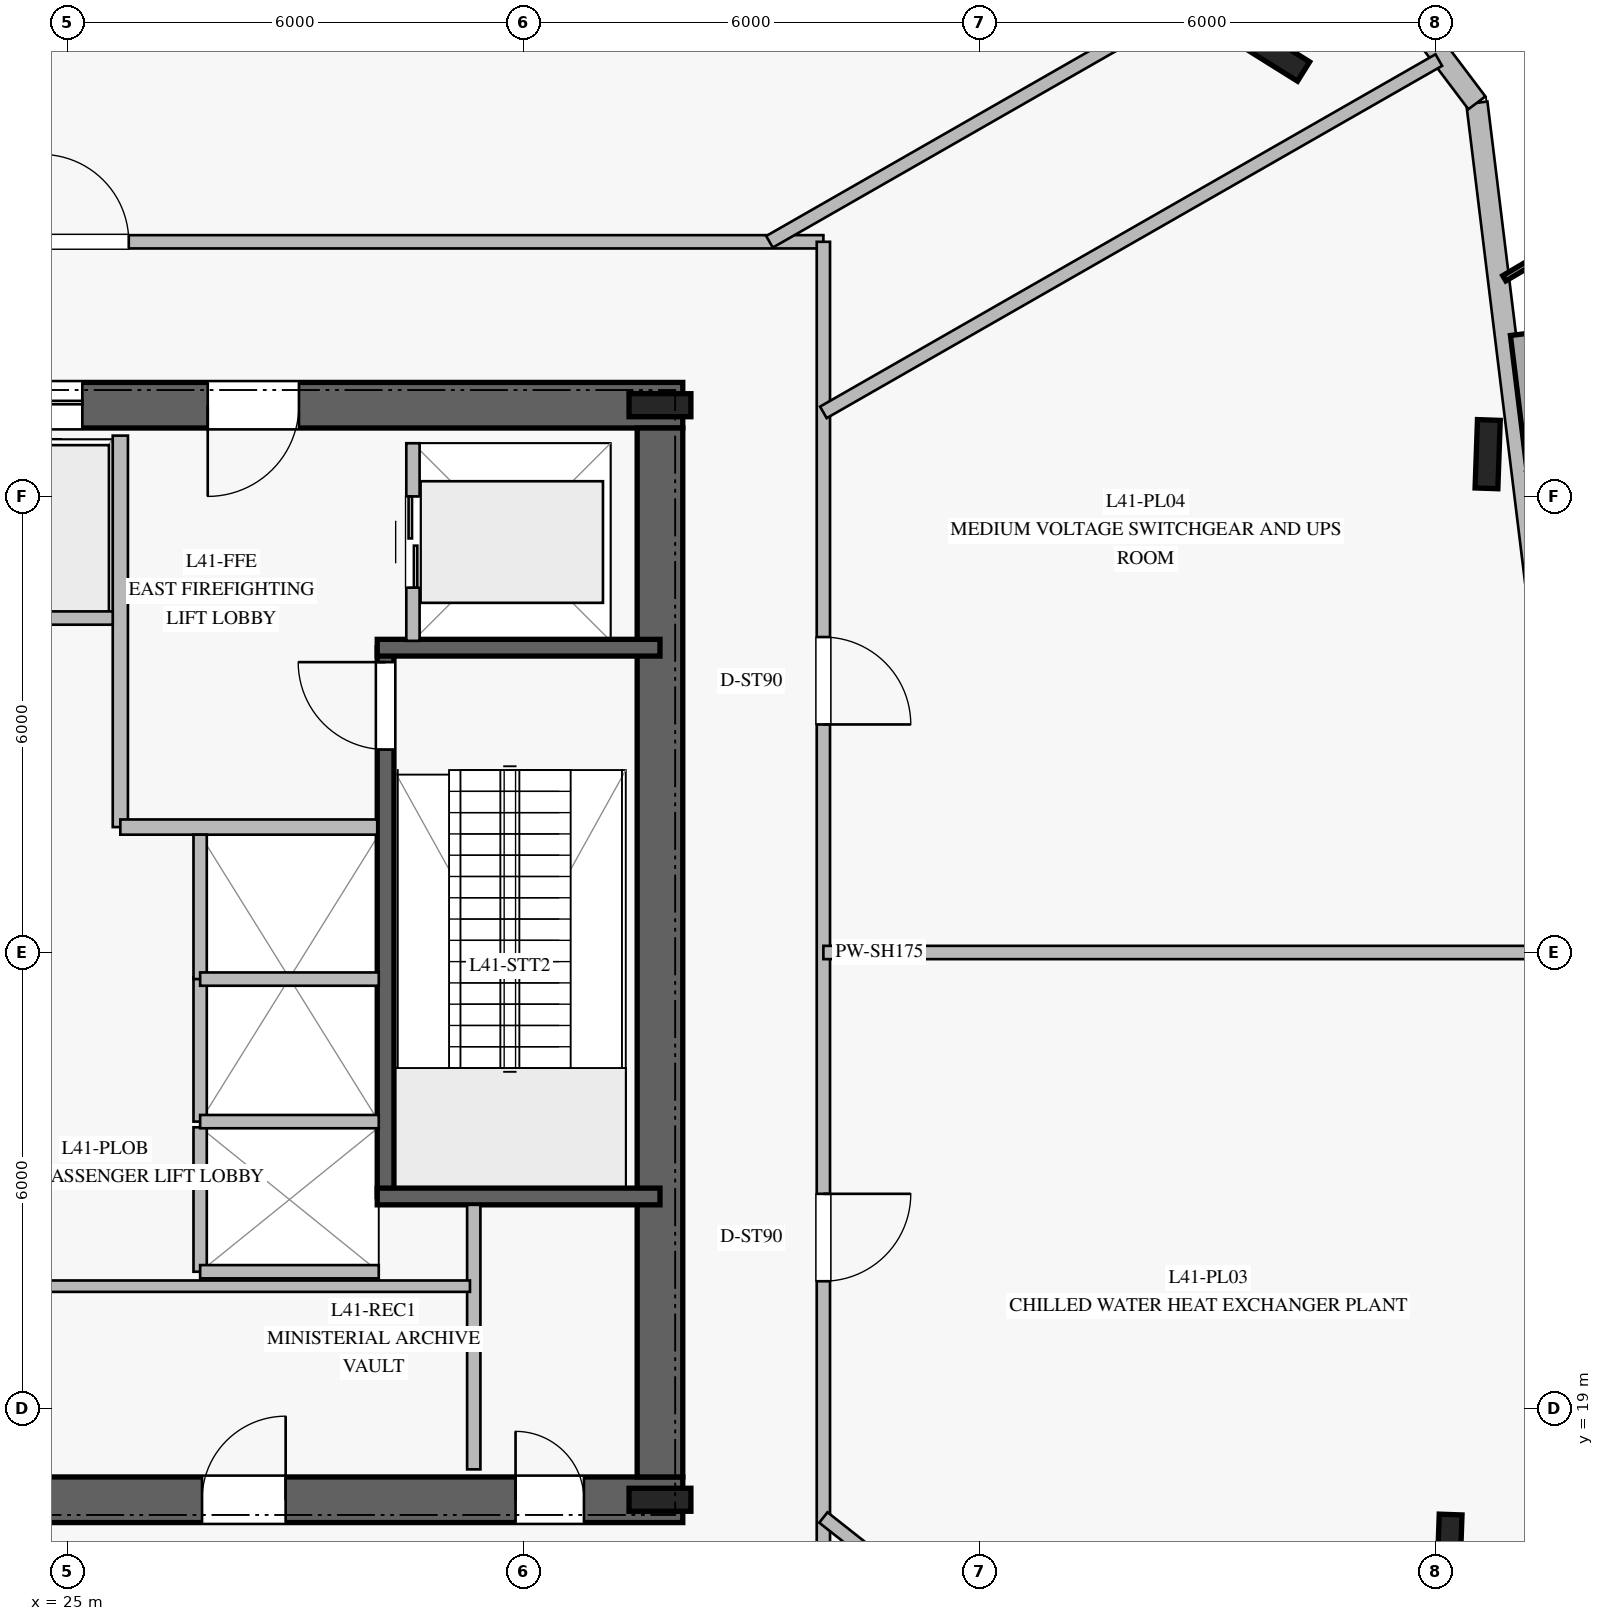
"""IFC4 building model, lengths in metres.
Left out: names, types, materials, properties, quantities, classifications, styles, units other than length and angle.
Written with IfcOpenShell. Run it as: python <this file> out.ifc"""

import sys

from ifc_helpers import new_model, si_unit, direction, frame, frame_2d, origin, origin_2d, place, context, subcontext, project, spatial, rectangle, i_section, extrude, element, fill, save


model = new_model("IFC4")
c1 = context("Model", 3, precision=1e-05, world=origin(), true_north=direction((0.0, 1.0)))
c2 = subcontext(c1, "Body", "Model", "MODEL_VIEW")
j1 = project(units=[si_unit("LENGTHUNIT", "METRE"), si_unit("PLANEANGLEUNIT", "RADIAN")], contexts=[c1])
p1 = place(None, origin())
s1 = spatial("IfcSite", under=j1, at=p1, CompositionType="ELEMENT")
p2 = place(p1, origin())
s2 = spatial("IfcBuilding", under=s1, at=p2, CompositionType="ELEMENT")
p3 = place(p2, frame((0.0, 0.0, 170.4)))
s3 = spatial("IfcBuildingStorey", under=s2, at=p3, CompositionType="ELEMENT", Elevation=170.4)
p4 = place(p3, frame((16.9, 17.8, 0.0), z_axis=(0.0, 0.0, 1.0), x_axis=(1.0, 0.0, 0.0)))
e1 = element("IfcWall", 1, at=p4, inside=s3, PredefinedType="SHEAR", context=c2, shape_type="SweptSolid", body=[
    extrude(rectangle(XDim=16.2, YDim=0.6, at=frame_2d((8.1, 0.0))), origin(), (0.0, 0.0, 1.0), 5.14),
])
p5 = place(p4, frame((5.05, 0.0, 0.0)))
e2 = element("IfcOpeningElement", 2, at=p5, cuts=e1, PredefinedType="OPENING", context=c2, shape_type="SweptSolid", body=[
    extrude(rectangle(XDim=1.2, YDim=2.25, at=frame_2d((0.6, 1.125))), frame((0.0, 0.31, 0.0), z_axis=(0.0, -1.0, 0.0), x_axis=(1.0, 0.0, 0.0)), (0.0, 0.0, 1.0), 0.62),
])
p6 = place(p4, frame((14.0, 0.0, 0.0)))
e3 = element("IfcOpeningElement", 3, at=p6, cuts=e1, PredefinedType="OPENING", context=c2, shape_type="SweptSolid", body=[
    extrude(rectangle(XDim=0.9, YDim=2.1, at=frame_2d((0.45, 1.05))), frame((0.0, 0.31, 0.0), z_axis=(0.0, -1.0, 0.0), x_axis=(1.0, 0.0, 0.0)), (0.0, 0.0, 1.0), 0.62),
])
p7 = place(p4, frame((9.875, 0.0, 0.0)))
e4 = element("IfcOpeningElement", 4, at=p7, cuts=e1, PredefinedType="OPENING", context=c2, shape_type="SweptSolid", body=[
    extrude(rectangle(XDim=1.1, YDim=2.2, at=frame_2d((0.55, 1.1))), frame((0.0, 0.31, 0.0), z_axis=(0.0, -1.0, 0.0), x_axis=(1.0, 0.0, 0.0)), (0.0, 0.0, 1.0), 0.62),
])
p8 = place(p3, frame((33.1, 32.2, 0.0), z_axis=(0.0, 0.0, 1.0), x_axis=(-1.0, 0.0, 0.0)))
e5 = element("IfcWall", 5, at=p8, inside=s3, PredefinedType="SHEAR", context=c2, shape_type="SweptSolid", body=[
    extrude(rectangle(XDim=16.2, YDim=0.6, at=frame_2d((8.1, 0.0))), origin(), (0.0, 0.0, 1.0), 5.14),
])
p9 = place(p8, frame((5.05, 0.0, 0.0)))
e6 = element("IfcOpeningElement", 6, at=p9, cuts=e5, PredefinedType="OPENING", context=c2, shape_type="SweptSolid", body=[
    extrude(rectangle(XDim=1.2, YDim=2.25, at=frame_2d((0.6, 1.125))), frame((0.0, 0.31, 0.0), z_axis=(0.0, -1.0, 0.0), x_axis=(1.0, 0.0, 0.0)), (0.0, 0.0, 1.0), 0.62),
])
p10 = place(p8, frame((11.85, 0.0, 0.0)))
e7 = element("IfcOpeningElement", 7, at=p10, cuts=e5, PredefinedType="OPENING", context=c2, shape_type="SweptSolid", body=[
    extrude(rectangle(XDim=1.1, YDim=2.2, at=frame_2d((0.55, 1.1))), frame((0.0, 0.31, 0.0), z_axis=(0.0, -1.0, 0.0), x_axis=(1.0, 0.0, 0.0)), (0.0, 0.0, 1.0), 0.62),
])
p11 = place(p8, frame((9.875, 0.0, 0.0)))
e8 = element("IfcOpeningElement", 8, at=p11, cuts=e5, PredefinedType="OPENING", context=c2, shape_type="SweptSolid", body=[
    extrude(rectangle(XDim=1.1, YDim=2.2, at=frame_2d((0.55, 1.1))), frame((0.0, 0.31, 0.0), z_axis=(0.0, -1.0, 0.0), x_axis=(1.0, 0.0, 0.0)), (0.0, 0.0, 1.0), 0.62),
])
p12 = place(p8, frame((7.9, 0.0, 0.0)))
e9 = element("IfcOpeningElement", 9, at=p12, cuts=e5, PredefinedType="OPENING", context=c2, shape_type="SweptSolid", body=[
    extrude(rectangle(XDim=1.1, YDim=2.2, at=frame_2d((0.55, 1.1))), frame((0.0, 0.31, 0.0), z_axis=(0.0, -1.0, 0.0), x_axis=(1.0, 0.0, 0.0)), (0.0, 0.0, 1.0), 0.62),
])
p13 = place(p3, frame((32.8, 18.1, 0.0), z_axis=(0.0, 0.0, 1.0), x_axis=(0.0, 1.0, 0.0)))
e10 = element("IfcWall", 10, at=p13, inside=s3, PredefinedType="SHEAR", context=c2, shape_type="SweptSolid", body=[
    extrude(rectangle(XDim=13.8, YDim=0.6, at=frame_2d((6.9, 0.0))), origin(), (0.0, 0.0, 1.0), 5.14),
])
for number, where, z_axis, x_axis in (
    (11, (32.8, 17.8, 0.0), (0.0, 0.0, 1.0), (1.0, 0.0, 0.0)),
    (12, (32.8, 32.2, 0.0), (0.0, 0.0, 1.0), (1.0, 0.0, 0.0)),
):
    element("IfcColumn", number, at=place(p3, frame(where, z_axis=z_axis, x_axis=x_axis)), inside=s3, PredefinedType="COLUMN", context=c2, shape_type="SweptSolid", body=[
        extrude(i_section(OverallWidth=0.303, OverallDepth=0.814, WebThickness=0.021, FlangeThickness=0.04, at=origin_2d()), origin(), (0.0, 0.0, 1.0), 5.4),
    ])
p14 = place(p3, frame((29.19, 21.79, 0.0), z_axis=(0.0, 0.0, 1.0), x_axis=(0.0, 1.0, 0.0)))
e13 = element("IfcWall", 13, at=p14, inside=s3, PredefinedType="SOLIDWALL", context=c2, shape_type="SweptSolid", body=[
    extrude(rectangle(XDim=7.22, YDim=0.22, at=frame_2d((3.61, 0.0))), origin(), (0.0, 0.0, 1.0), 5.14),
])
p15 = place(p14, frame((5.88, 0.0, 0.0)))
e14 = element("IfcOpeningElement", 14, at=p15, cuts=e13, PredefinedType="OPENING", context=c2, shape_type="SweptSolid", body=[
    extrude(rectangle(XDim=1.15, YDim=2.2, at=frame_2d((0.575, 1.1))), frame((0.0, 0.12, 0.0), z_axis=(0.0, -1.0, 0.0), x_axis=(1.0, 0.0, 0.0)), (0.0, 0.0, 1.0), 0.24),
])
for number, where, z_axis, x_axis in (
    (15, (29.08, 21.79, 0.0), (0.0, 0.0, 1.0), (1.0, 0.0, 0.0)),
    (16, (29.08, 29.01, 0.0), (0.0, 0.0, 1.0), (1.0, 0.0, 0.0)),
):
    element("IfcWall", number, at=place(p3, frame(where, z_axis=z_axis, x_axis=x_axis)), inside=s3, PredefinedType="SOLIDWALL", context=c2, shape_type="SweptSolid", body=[
        extrude(rectangle(XDim=3.72, YDim=0.22, at=frame_2d((1.86, 0.0))), origin(), (0.0, 0.0, 1.0), 5.14),
    ])
for number, where, z_axis, x_axis in (
    (17, (40.886, 36.829, 0.0), (0.0, 0.0, 1.0), (-0.848, 0.53, 0.0)),
    (18, (43.187, 17.156, 0.0), (0.0, 0.0, 1.0), (0.035, 0.999, 0.0)),
    (19, (43.69, 31.556, 0.0), (0.0, 0.0, 1.0), (0.035, 0.999, 0.0)),
):
    element("IfcColumn", number, at=place(p3, frame(where, z_axis=z_axis, x_axis=x_axis)), inside=s3, PredefinedType="COLUMN", context=c2, shape_type="SweptSolid", body=[
        extrude(i_section(OverallWidth=0.3, OverallDepth=0.9, WebThickness=0.019, FlangeThickness=0.035, at=origin_2d()), origin(), (0.0, 0.0, 1.0), 5.4),
    ])
p16 = place(p3, frame((43.954, 14.526, 0.0), z_axis=(0.0, 0.0, 1.0), x_axis=(0.390733557702, 0.920503822309, 0.0)))
e20 = element("IfcWall", 20, at=p16, inside=s3, PredefinedType="STANDARD", context=c2, shape_type="SweptSolid", body=[
    extrude(rectangle(XDim=4.471, YDim=0.28, at=frame_2d((2.235, 0.0))), origin(), (0.0, 0.0, 1.0), 5.14),
])
p17 = place(p3, frame((45.701, 18.641, 0.0), z_axis=(0.0, 0.0, 1.0), x_axis=(-0.121845687451, 0.992549055941, 0.0)))
e21 = element("IfcWall", 21, at=p17, inside=s3, PredefinedType="STANDARD", context=c2, shape_type="SweptSolid", body=[
    extrude(rectangle(XDim=17.668, YDim=0.28, at=frame_2d((8.834, 0.0))), origin(), (0.0, 0.0, 1.0), 5.14),
])
p18 = place(p3, frame((43.548, 36.178, 0.0), z_axis=(0.0, 0.0, 1.0), x_axis=(-0.601841660076, 0.798615436989, 0.0)))
e22 = element("IfcWall", 22, at=p18, inside=s3, PredefinedType="STANDARD", context=c2, shape_type="SweptSolid", body=[
    extrude(rectangle(XDim=4.471, YDim=0.28, at=frame_2d((2.236, 0.0))), origin(), (0.0, 0.0, 1.0), 5.14),
])
p19 = place(p3, frame((25.7, 26.65, 0.0), z_axis=(0.0, 0.0, 1.0), x_axis=(0.0, 1.0, 0.0)))
e23 = element("IfcWall", 23, at=p19, inside=s3, PredefinedType="PARTITIONING", context=c2, shape_type="SweptSolid", body=[
    extrude(rectangle(XDim=5.15, YDim=0.2, at=frame_2d((2.575, 0.0))), origin(), (0.0, 0.0, 1.0), 5.14),
])
p20 = place(p3, frame((25.7, 26.65, 0.0), z_axis=(0.0, 0.0, 1.0), x_axis=(1.0, 0.0, 0.0)))
e24 = element("IfcWall", 24, at=p20, inside=s3, PredefinedType="PARTITIONING", context=c2, shape_type="SweptSolid", body=[
    extrude(rectangle(XDim=3.38, YDim=0.2, at=frame_2d((1.69, 0.0))), origin(), (0.0, 0.0, 1.0), 5.14),
])
p21 = place(p3, frame((30.35, 18.2, 0.0), z_axis=(0.0, 0.0, 1.0), x_axis=(0.0, 1.0, 0.0)))
e25 = element("IfcWall", 25, at=p21, inside=s3, PredefinedType="PARTITIONING", context=c2, shape_type="SweptSolid", body=[
    extrude(rectangle(XDim=3.48, YDim=0.175, at=frame_2d((1.74, 0.0))), origin(), (0.0, 0.0, 1.0), 5.14),
])
p22 = place(p3, frame((24.4, 20.61, 0.0), z_axis=(0.0, 0.0, 1.0), x_axis=(1.0, 0.0, 0.0)))
e26 = element("IfcWall", 26, at=p22, inside=s3, PredefinedType="PARTITIONING", context=c2, shape_type="SweptSolid", body=[
    extrude(rectangle(XDim=5.9, YDim=0.15, at=frame_2d((2.95, 0.0))), origin(), (0.0, 0.0, 1.0), 5.14),
])
p23 = place(p3, frame((23.7, 29.4, 0.0), z_axis=(0.0, 0.0, 1.0), x_axis=(1.0, 0.0, 0.0)))
e27 = element("IfcWall", 27, at=p23, inside=s3, PredefinedType="PARTITIONING", context=c2, shape_type="SweptSolid", body=[
    extrude(rectangle(XDim=1.9, YDim=0.175, at=frame_2d((0.95, 0.0))), origin(), (0.0, 0.0, 1.0), 5.14),
])
p24 = place(p3, frame((26.75, 20.8, 0.0), z_axis=(0.0, 0.0, 1.0), x_axis=(0.0, 1.0, 0.0)))
e28 = element("IfcWall", 28, at=p24, inside=s3, PredefinedType="PARTITIONING", context=c2, shape_type="SweptSolid", body=[
    extrude(rectangle(XDim=1.9, YDim=0.175, at=frame_2d((0.95, 0.0))), origin(), (0.0, 0.0, 1.0), 5.14),
])
p25 = place(p3, frame((26.75, 20.8, 0.0), z_axis=(0.0, 0.0, 1.0), x_axis=(1.0, 0.0, 0.0)))
e29 = element("IfcWall", 29, at=p25, inside=s3, PredefinedType="PARTITIONING", context=c2, shape_type="SweptSolid", body=[
    extrude(rectangle(XDim=2.35, YDim=0.175, at=frame_2d((1.175, 0.0))), origin(), (0.0, 0.0, 1.0), 5.14),
])
p26 = place(p3, frame((26.75, 22.775, 0.0), z_axis=(0.0, 0.0, 1.0), x_axis=(0.0, 1.0, 0.0)))
e30 = element("IfcWall", 30, at=p26, inside=s3, PredefinedType="PARTITIONING", context=c2, shape_type="SweptSolid", body=[
    extrude(rectangle(XDim=1.9, YDim=0.175, at=frame_2d((0.95, 0.0))), origin(), (0.0, 0.0, 1.0), 5.14),
])
p27 = place(p3, frame((26.75, 22.775, 0.0), z_axis=(0.0, 0.0, 1.0), x_axis=(1.0, 0.0, 0.0)))
e31 = element("IfcWall", 31, at=p27, inside=s3, PredefinedType="PARTITIONING", context=c2, shape_type="SweptSolid", body=[
    extrude(rectangle(XDim=2.35, YDim=0.175, at=frame_2d((1.175, 0.0))), origin(), (0.0, 0.0, 1.0), 5.14),
])
p28 = place(p3, frame((26.75, 24.65, 0.0), z_axis=(0.0, 0.0, 1.0), x_axis=(0.0, 1.0, 0.0)))
e32 = element("IfcWall", 32, at=p28, inside=s3, PredefinedType="PARTITIONING", context=c2, shape_type="SweptSolid", body=[
    extrude(rectangle(XDim=1.9, YDim=0.175, at=frame_2d((0.95, 0.0))), origin(), (0.0, 0.0, 1.0), 5.14),
])
p29 = place(p3, frame((26.75, 24.65, 0.0), z_axis=(0.0, 0.0, 1.0), x_axis=(1.0, 0.0, 0.0)))
e33 = element("IfcWall", 33, at=p29, inside=s3, PredefinedType="PARTITIONING", context=c2, shape_type="SweptSolid", body=[
    extrude(rectangle(XDim=2.35, YDim=0.175, at=frame_2d((1.175, 0.0))), origin(), (0.0, 0.0, 1.0), 5.14),
])
p30 = place(p3, frame((29.55, 29.1, 0.0), z_axis=(0.0, 0.0, 1.0), x_axis=(0.0, 1.0, 0.0)))
e34 = element("IfcWall", 34, at=p30, inside=s3, PredefinedType="PARTITIONING", context=c2, shape_type="SweptSolid", body=[
    extrude(rectangle(XDim=2.6, YDim=0.175, at=frame_2d((1.3, 0.0))), origin(), (0.0, 0.0, 1.0), 5.14),
])
p31 = place(p30, frame((0.7, 0.0, 0.0)))
e35 = element("IfcOpeningElement", 35, at=p31, cuts=e34, PredefinedType="OPENING", context=c2, shape_type="SweptSolid", body=[
    extrude(rectangle(XDim=1.2, YDim=2.2, at=frame_2d((0.6, 1.1))), frame((0.0, 0.098, 0.0), z_axis=(0.0, -1.0, 0.0), x_axis=(1.0, 0.0, 0.0)), (0.0, 0.0, 1.0), 0.195),
])
p32 = place(p3, frame((15.05, 34.35, 0.0), z_axis=(0.0, 0.0, 1.0), x_axis=(1.0, 0.0, 0.0)))
e36 = element("IfcWall", 36, at=p32, inside=s3, PredefinedType="PARTITIONING", context=c2, shape_type="SweptSolid", body=[
    extrude(rectangle(XDim=19.9, YDim=0.175, at=frame_2d((9.95, 0.0))), origin(), (0.0, 0.0, 1.0), 3.54),
])
p33 = place(p32, frame((9.611, 0.0, 0.0)))
e37 = element("IfcOpeningElement", 37, at=p33, cuts=e36, PredefinedType="OPENING", context=c2, shape_type="SweptSolid", body=[
    extrude(rectangle(XDim=1.15, YDim=2.2, at=frame_2d((0.575, 1.1))), frame((0.0, 0.098, 0.0), z_axis=(0.0, -1.0, 0.0), x_axis=(1.0, 0.0, 0.0)), (0.0, 0.0, 1.0), 0.195),
])
p34 = place(p3, frame((34.95, 34.35, 0.0), z_axis=(0.0, 0.0, 1.0), x_axis=(0.0, -1.0, 0.0)))
e38 = element("IfcWall", 38, at=p34, inside=s3, PredefinedType="PARTITIONING", context=c2, shape_type="SweptSolid", body=[
    extrude(rectangle(XDim=18.7, YDim=0.175, at=frame_2d((9.35, 0.0))), origin(), (0.0, 0.0, 1.0), 3.54),
])
p35 = place(p34, frame((12.525, 0.0, 0.0)))
e39 = element("IfcOpeningElement", 39, at=p35, cuts=e38, PredefinedType="OPENING", context=c2, shape_type="SweptSolid", body=[
    extrude(rectangle(XDim=1.15, YDim=2.2, at=frame_2d((0.575, 1.1))), frame((0.0, 0.098, 0.0), z_axis=(0.0, -1.0, 0.0), x_axis=(1.0, 0.0, 0.0)), (0.0, 0.0, 1.0), 0.195),
])
p36 = place(p34, frame((5.2, 0.0, 0.0)))
e40 = element("IfcOpeningElement", 40, at=p36, cuts=e38, PredefinedType="OPENING", context=c2, shape_type="SweptSolid", body=[
    extrude(rectangle(XDim=1.15, YDim=2.2, at=frame_2d((0.575, 1.1))), frame((0.0, 0.098, 0.0), z_axis=(0.0, -1.0, 0.0), x_axis=(1.0, 0.0, 0.0)), (0.0, 0.0, 1.0), 0.195),
])
p37 = place(p3, frame((34.95, 17.567, 0.0), z_axis=(0.0, 0.0, 1.0), x_axis=(0.784559222655, -0.620053889712, 0.0)))
e41 = element("IfcWall", 41, at=p37, inside=s3, PredefinedType="PARTITIONING", context=c2, shape_type="SweptSolid", body=[
    extrude(rectangle(XDim=8.038, YDim=0.175, at=frame_2d((4.019, 0.0))), origin(), (0.0, 0.0, 1.0), 3.53),
])
p38 = place(p3, frame((34.95, 32.106, 0.0), z_axis=(0.0, 0.0, 1.0), x_axis=(0.867870917182, 0.496789765504, 0.0)))
e42 = element("IfcWall", 42, at=p38, inside=s3, PredefinedType="PARTITIONING", context=c2, shape_type="SweptSolid", body=[
    extrude(rectangle(XDim=9.33, YDim=0.175, at=frame_2d((4.665, 0.0))), origin(), (0.0, 0.0, 1.0), 3.53),
])
p39 = place(p3, frame((34.241, 34.35, 0.0), z_axis=(0.0, 0.0, 1.0), x_axis=(0.86783997446, 0.49684381724, 0.0)))
e43 = element("IfcWall", 43, at=p39, inside=s3, PredefinedType="PARTITIONING", context=c2, shape_type="SweptSolid", body=[
    extrude(rectangle(XDim=8.54, YDim=0.175, at=frame_2d((4.27, 0.0))), origin(), (0.0, 0.0, 1.0), 3.53),
])
p40 = place(p3, frame((34.95, 25.0, 0.0), z_axis=(0.0, 0.0, 1.0), x_axis=(1.0, 0.0, 0.0)))
e44 = element("IfcWall", 44, at=p40, inside=s3, PredefinedType="PARTITIONING", context=c2, shape_type="SweptSolid", body=[
    extrude(rectangle(XDim=9.898, YDim=0.175, at=frame_2d((4.949, 0.0))), origin(), (0.0, 0.0, 1.0), 3.53),
])
p41 = place(p15, origin())
e45 = element("IfcDoor", 45, at=p41, inside=s3, OperationType="SINGLE_SWING_RIGHT", PredefinedType="DOOR", context=c2, shape_type="SweptSolid", body=[
    extrude(rectangle(XDim=1.15, YDim=2.2, at=frame_2d((0.575, 1.1))), frame((0.0, 0.025, 0.0), z_axis=(0.0, -1.0, 0.0), x_axis=(1.0, 0.0, 0.0)), (0.0, 0.0, 1.0), 0.05),
])
fill(e14, e45)
p42 = place(p9, origin())
e46 = element("IfcDoor", 46, at=p42, inside=s3, OperationType="SINGLE_SWING_RIGHT", PredefinedType="DOOR", context=c2, shape_type="SweptSolid", body=[
    extrude(rectangle(XDim=1.2, YDim=2.25, at=frame_2d((0.6, 1.125))), frame((0.0, 0.025, 0.0), z_axis=(0.0, -1.0, 0.0), x_axis=(1.0, 0.0, 0.0)), (0.0, 0.0, 1.0), 0.05),
])
fill(e6, e46)
p43 = place(p6, origin())
e47 = element("IfcDoor", 47, at=p43, inside=s3, OperationType="SINGLE_SWING_LEFT", PredefinedType="DOOR", context=c2, shape_type="SweptSolid", body=[
    extrude(rectangle(XDim=0.9, YDim=2.1, at=frame_2d((0.45, 1.05))), frame((0.0, 0.025, 0.0), z_axis=(0.0, -1.0, 0.0), x_axis=(1.0, 0.0, 0.0)), (0.0, 0.0, 1.0), 0.05),
])
fill(e3, e47)
p44 = place(p7, origin())
e48 = element("IfcDoor", 48, at=p44, inside=s3, OperationType="SINGLE_SWING_RIGHT", PredefinedType="DOOR", context=c2, shape_type="SweptSolid", body=[
    extrude(rectangle(XDim=1.1, YDim=2.2, at=frame_2d((0.55, 1.1))), frame((0.0, 0.025, 0.0), z_axis=(0.0, -1.0, 0.0), x_axis=(1.0, 0.0, 0.0)), (0.0, 0.0, 1.0), 0.05),
])
fill(e4, e48)
p45 = place(p12, origin())
e49 = element("IfcDoor", 49, at=p45, inside=s3, OperationType="DOUBLE_DOOR_SLIDING", PredefinedType="DOOR", context=c2, shape_type="SweptSolid", body=[
    extrude(rectangle(XDim=1.1, YDim=2.2, at=frame_2d((0.55, 1.1))), frame((0.0, 0.025, 0.0), z_axis=(0.0, -1.0, 0.0), x_axis=(1.0, 0.0, 0.0)), (0.0, 0.0, 1.0), 0.05),
])
fill(e9, e49)
p46 = place(p31, origin())
e50 = element("IfcDoor", 50, at=p46, inside=s3, OperationType="DOUBLE_DOOR_SLIDING", PredefinedType="DOOR", context=c2, shape_type="SweptSolid", body=[
    extrude(rectangle(XDim=1.2, YDim=2.2, at=frame_2d((0.6, 1.1))), frame((0.0, 0.025, 0.0), z_axis=(0.0, -1.0, 0.0), x_axis=(1.0, 0.0, 0.0)), (0.0, 0.0, 1.0), 0.05),
])
fill(e35, e50)
p47 = place(p35, origin())
e51 = element("IfcDoor", 51, at=p47, inside=s3, OperationType="SINGLE_SWING_LEFT", PredefinedType="DOOR", context=c2, shape_type="SweptSolid", body=[
    extrude(rectangle(XDim=1.15, YDim=2.2, at=frame_2d((0.575, 1.1))), frame((0.0, 0.025, 0.0), z_axis=(0.0, -1.0, 0.0), x_axis=(1.0, 0.0, 0.0)), (0.0, 0.0, 1.0), 0.05),
])
fill(e39, e51)
p48 = place(p36, origin())
e52 = element("IfcDoor", 52, at=p48, inside=s3, OperationType="SINGLE_SWING_RIGHT", PredefinedType="DOOR", context=c2, shape_type="SweptSolid", body=[
    extrude(rectangle(XDim=1.15, YDim=2.2, at=frame_2d((0.575, 1.1))), frame((0.0, 0.025, 0.0), z_axis=(0.0, -1.0, 0.0), x_axis=(1.0, 0.0, 0.0)), (0.0, 0.0, 1.0), 0.05),
])
fill(e40, e52)
p49 = place(p33, origin())
e53 = element("IfcDoor", 53, at=p49, inside=s3, OperationType="SINGLE_SWING_LEFT", PredefinedType="DOOR", context=c2, shape_type="SweptSolid", body=[
    extrude(rectangle(XDim=1.15, YDim=2.2, at=frame_2d((0.575, 1.1))), frame((0.0, 0.025, 0.0), z_axis=(0.0, -1.0, 0.0), x_axis=(1.0, 0.0, 0.0)), (0.0, 0.0, 1.0), 0.05),
])
fill(e37, e53)
save(model, sys.argv[1])
